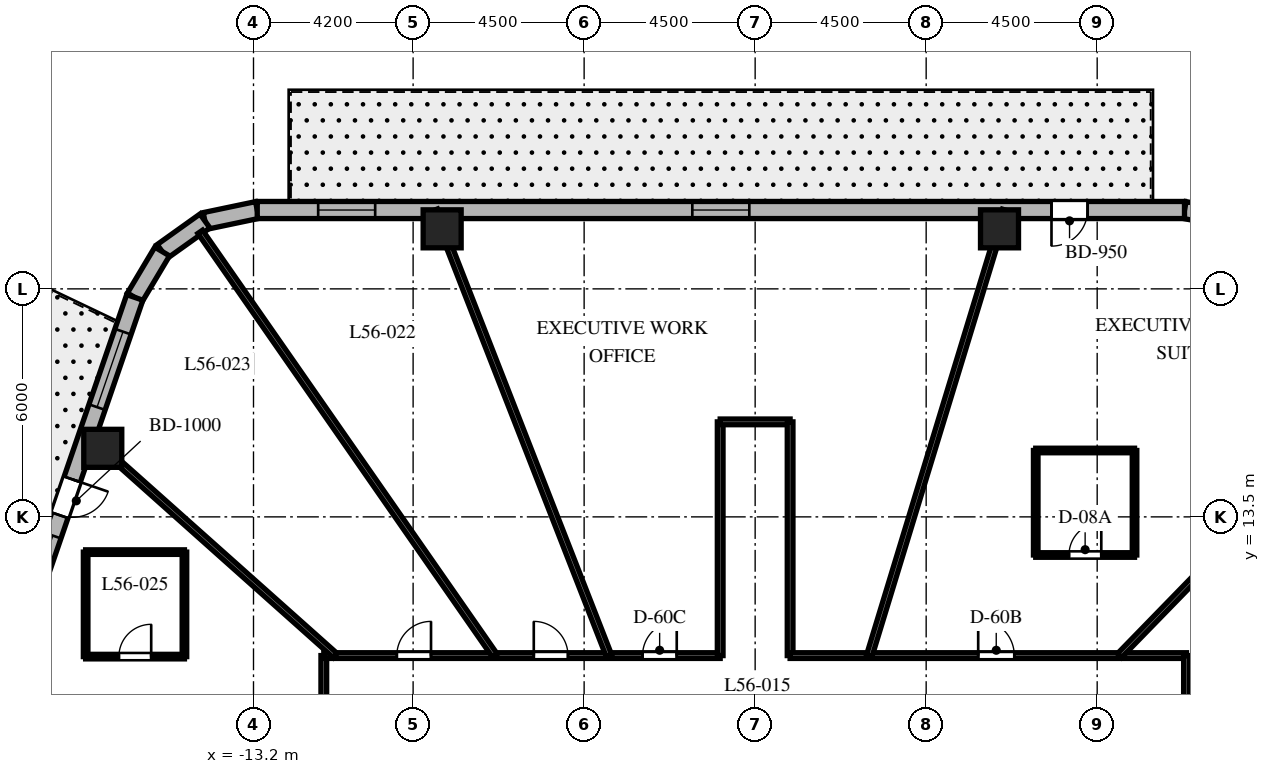
"""IFC4 building model, lengths in metres.
Left out: names, types, materials, properties, quantities, classifications, styles, units other than length and angle.
Written with IfcOpenShell. Run it as: python <this file> out.ifc"""

import sys

from ifc_helpers import new_model, si_unit, direction, frame, frame_2d, origin, origin_2d, place, context, subcontext, project, spatial, rectangle, extrude, element, fill, save


model = new_model("IFC4")
c1 = context("Model", 3, precision=1e-05, world=origin(), true_north=direction((0.0, 1.0)))
c2 = subcontext(c1, "Body", "Model", "MODEL_VIEW")
j1 = project(units=[si_unit("LENGTHUNIT", "METRE"), si_unit("PLANEANGLEUNIT", "RADIAN")], contexts=[c1])
p1 = place(None, origin())
s1 = spatial("IfcSite", under=j1, at=p1, CompositionType="ELEMENT")
p2 = place(p1, origin())
s2 = spatial("IfcBuilding", under=s1, at=p2, CompositionType="ELEMENT")
p3 = place(p2, frame((0.0, 0.0, 225.5)))
s3 = spatial("IfcBuildingStorey", under=s2, at=p3, CompositionType="ELEMENT", Elevation=225.5)
for number, where, z_axis, x_axis in (
    (1, (6.43, 21.08, 0.0), (0.0, 0.0, 1.0), (1.0, 0.0, 0.0)),
    (2, (-8.236, 21.08, 0.0), (0.0, 0.0, 1.0), (1.0, 0.0, 0.0)),
    (3, (-17.166, 15.304, 0.0), (0.0, 0.0, 1.0), (1.0, 0.0, 0.0)),
):
    element("IfcColumn", number, at=place(p3, frame(where, z_axis=z_axis, x_axis=x_axis)), inside=s3, PredefinedType="COLUMN", context=c2, shape_type="SweptSolid", body=[
        extrude(rectangle(XDim=1.0, YDim=1.0, at=origin_2d()), origin(), (0.0, 0.0, 1.0), 3.8),
    ])
p4 = place(p3, frame((12.546, 21.34, 0.0), z_axis=(0.0, 0.0, 1.0), x_axis=(-0.982686750835, 0.18527479519, 0.0)))
e4 = element("IfcWall", 4, at=p4, inside=s3, PredefinedType="SOLIDWALL", context=c2, shape_type="SweptSolid", body=[
    extrude(rectangle(XDim=1.27, YDim=0.45, at=frame_2d((0.635, 0.0))), origin(), (0.0, 0.0, 1.0), 3.5),
])
p5 = place(p3, frame((-13.102, 21.575, 0.0), z_axis=(0.0, 0.0, 1.0), x_axis=(-0.978757421505, -0.205021730188, 0.0)))
e5 = element("IfcWall", 5, at=p5, inside=s3, PredefinedType="SOLIDWALL", context=c2, shape_type="SweptSolid", body=[
    extrude(rectangle(XDim=1.406, YDim=0.45, at=frame_2d((0.703, 0.0))), origin(), (0.0, 0.0, 1.0), 3.5),
])
p6 = place(p3, frame((-14.478, 21.287, 0.0), z_axis=(0.0, 0.0, 1.0), x_axis=(-0.813888518617, -0.58102106611, 0.0)))
e6 = element("IfcWall", 6, at=p6, inside=s3, PredefinedType="SOLIDWALL", context=c2, shape_type="SweptSolid", body=[
    extrude(rectangle(XDim=1.383, YDim=0.45, at=frame_2d((0.691, 0.0))), origin(), (0.0, 0.0, 1.0), 3.5),
])
p7 = place(p3, frame((-15.604, 20.483, 0.0), z_axis=(0.0, 0.0, 1.0), x_axis=(-0.512222149036, -0.858852996756, 0.0)))
e7 = element("IfcWall", 7, at=p7, inside=s3, PredefinedType="SOLIDWALL", context=c2, shape_type="SweptSolid", body=[
    extrude(rectangle(XDim=1.406, YDim=0.45, at=frame_2d((0.703, 0.0))), origin(), (0.0, 0.0, 1.0), 3.5),
])
p8 = place(p3, frame((11.298, 21.575, 0.0), z_axis=(0.0, 0.0, 1.0), x_axis=(-1.0, 0.0, 0.0)))
e8 = element("IfcWall", 8, at=p8, inside=s3, PredefinedType="SOLIDWALL", context=c2, shape_type="SweptSolid", body=[
    extrude(rectangle(XDim=24.399, YDim=0.45, at=frame_2d((12.2, 0.0))), origin(), (0.0, 0.0, 1.0), 3.5),
])
p9 = place(p8, frame((2.55, 0.0, 0.0)))
e9 = element("IfcOpeningElement", 9, at=p9, cuts=e8, PredefinedType="OPENING", context=c2, shape_type="SweptSolid", body=[
    extrude(rectangle(XDim=0.95, YDim=2.15, at=frame_2d((0.475, 1.075))), frame((0.0, 0.235, 0.0), z_axis=(0.0, -1.0, 0.0), x_axis=(1.0, 0.0, 0.0)), (0.0, 0.0, 1.0), 0.47),
])
p10 = place(p8, frame((11.451, 0.0, 0.8)))
e10 = element("IfcOpeningElement", 10, at=p10, cuts=e8, PredefinedType="OPENING", context=c2, shape_type="SweptSolid", body=[
    extrude(rectangle(XDim=1.5, YDim=1.8, at=frame_2d((0.75, 0.9))), frame((0.0, 0.235, 0.0), z_axis=(0.0, -1.0, 0.0), x_axis=(1.0, 0.0, 0.0)), (0.0, 0.0, 1.0), 0.47),
])
p11 = place(p8, frame((21.296, 0.0, 0.8)))
e11 = element("IfcOpeningElement", 11, at=p11, cuts=e8, PredefinedType="OPENING", context=c2, shape_type="SweptSolid", body=[
    extrude(rectangle(XDim=1.5, YDim=1.8, at=frame_2d((0.75, 0.9))), frame((0.0, 0.235, 0.0), z_axis=(0.0, -1.0, 0.0), x_axis=(1.0, 0.0, 0.0)), (0.0, 0.0, 1.0), 0.47),
])
p12 = place(p3, frame((-16.324, 19.275, 0.0), z_axis=(0.0, 0.0, 1.0), x_axis=(-0.325083142304, -0.945685439557, 0.0)))
e12 = element("IfcWall", 12, at=p12, inside=s3, PredefinedType="SOLIDWALL", context=c2, shape_type="SweptSolid", body=[
    extrude(rectangle(XDim=20.224, YDim=0.45, at=frame_2d((10.112, 0.0))), origin(), (0.0, 0.0, 1.0), 3.5),
])
p13 = place(p12, frame((5.062, 0.0, 0.0)))
e13 = element("IfcOpeningElement", 13, at=p13, cuts=e12, PredefinedType="OPENING", context=c2, shape_type="SweptSolid", body=[
    extrude(rectangle(XDim=1.0, YDim=2.15, at=frame_2d((0.5, 1.075))), frame((0.0, 0.235, 0.0), z_axis=(0.0, -1.0, 0.0), x_axis=(1.0, 0.0, 0.0)), (0.0, 0.0, 1.0), 0.47),
])
p14 = place(p12, frame((0.953, 0.0, 0.8)))
e14 = element("IfcOpeningElement", 14, at=p14, cuts=e12, PredefinedType="OPENING", context=c2, shape_type="SweptSolid", body=[
    extrude(rectangle(XDim=2.1, YDim=1.85, at=frame_2d((1.05, 0.925))), frame((0.0, 0.235, 0.0), z_axis=(0.0, -1.0, 0.0), x_axis=(1.0, 0.0, 0.0)), (0.0, 0.0, 1.0), 0.47),
])
p15 = place(p12, frame((6.629, 0.0, 0.8)))
e15 = element("IfcOpeningElement", 15, at=p15, cuts=e12, PredefinedType="OPENING", context=c2, shape_type="SweptSolid", body=[
    extrude(rectangle(XDim=2.1, YDim=1.85, at=frame_2d((1.05, 0.925))), frame((0.0, 0.235, 0.0), z_axis=(0.0, -1.0, 0.0), x_axis=(1.0, 0.0, 0.0)), (0.0, 0.0, 1.0), 0.47),
])
p16 = place(p12, frame((12.312, 0.0, 0.8)))
e16 = element("IfcOpeningElement", 16, at=p16, cuts=e12, PredefinedType="OPENING", context=c2, shape_type="SweptSolid", body=[
    extrude(rectangle(XDim=2.1, YDim=1.85, at=frame_2d((1.05, 0.925))), frame((0.0, 0.235, 0.0), z_axis=(0.0, -1.0, 0.0), x_axis=(1.0, 0.0, 0.0)), (0.0, 0.0, 1.0), 0.47),
])
p17 = place(p12, frame((17.118, 0.0, 0.8)))
e17 = element("IfcOpeningElement", 17, at=p17, cuts=e12, PredefinedType="OPENING", context=c2, shape_type="SweptSolid", body=[
    extrude(rectangle(XDim=2.1, YDim=1.85, at=frame_2d((1.05, 0.925))), frame((0.0, 0.235, 0.0), z_axis=(0.0, -1.0, 0.0), x_axis=(1.0, 0.0, 0.0)), (0.0, 0.0, 1.0), 0.47),
])
p18 = place(p3, frame((-11.35, 4.4, 0.0), z_axis=(0.0, 0.0, 1.0), x_axis=(0.0, 1.0, 0.0)))
e18 = element("IfcWall", 18, at=p18, inside=s3, PredefinedType="PARTITIONING", context=c2, shape_type="SweptSolid", body=[
    extrude(rectangle(XDim=5.45, YDim=0.15, at=frame_2d((2.725, 0.0))), origin(), (0.0, 0.0, 1.0), 2.99),
])
p19 = place(p18, frame((2.466, 0.0, 0.0)))
e19 = element("IfcOpeningElement", 19, at=p19, cuts=e18, PredefinedType="OPENING", context=c2, shape_type="SweptSolid", body=[
    extrude(rectangle(XDim=0.95, YDim=2.03, at=frame_2d((0.475, 1.015))), frame((0.0, 0.085, 0.0), z_axis=(0.0, -1.0, 0.0), x_axis=(1.0, 0.0, 0.0)), (0.0, 0.0, 1.0), 0.17),
])
p20 = place(p3, frame((-11.35, 9.85, 0.0), z_axis=(0.0, 0.0, 1.0), x_axis=(1.0, 0.0, 0.0)))
e20 = element("IfcWall", 20, at=p20, inside=s3, PredefinedType="PARTITIONING", context=c2, shape_type="SweptSolid", body=[
    extrude(rectangle(XDim=10.43, YDim=0.15, at=frame_2d((5.215, 0.0))), origin(), (0.0, 0.0, 1.0), 2.99),
])
p21 = place(p20, frame((8.387, 0.0, 0.0)))
e21 = element("IfcOpeningElement", 21, at=p21, cuts=e20, PredefinedType="OPENING", context=c2, shape_type="SweptSolid", body=[
    extrude(rectangle(XDim=0.9, YDim=2.03, at=frame_2d((0.45, 1.015))), frame((0.0, 0.085, 0.0), z_axis=(0.0, -1.0, 0.0), x_axis=(1.0, 0.0, 0.0)), (0.0, 0.0, 1.0), 0.17),
])
p22 = place(p20, frame((5.525, 0.0, 0.0)))
e22 = element("IfcOpeningElement", 22, at=p22, cuts=e20, PredefinedType="OPENING", context=c2, shape_type="SweptSolid", body=[
    extrude(rectangle(XDim=0.9, YDim=2.03, at=frame_2d((0.45, 1.015))), frame((0.0, 0.085, 0.0), z_axis=(0.0, -1.0, 0.0), x_axis=(1.0, 0.0, 0.0)), (0.0, 0.0, 1.0), 0.17),
])
p23 = place(p20, frame((1.921, 0.0, 0.0)))
e23 = element("IfcOpeningElement", 23, at=p23, cuts=e20, PredefinedType="OPENING", context=c2, shape_type="SweptSolid", body=[
    extrude(rectangle(XDim=0.9, YDim=2.03, at=frame_2d((0.45, 1.015))), frame((0.0, 0.085, 0.0), z_axis=(0.0, -1.0, 0.0), x_axis=(1.0, 0.0, 0.0)), (0.0, 0.0, 1.0), 0.17),
])
p24 = place(p3, frame((-0.92, 9.85, 0.0), z_axis=(0.0, 0.0, 1.0), x_axis=(0.0, 1.0, 0.0)))
e24 = element("IfcWall", 24, at=p24, inside=s3, PredefinedType="PARTITIONING", context=c2, shape_type="SweptSolid", body=[
    extrude(rectangle(XDim=6.15, YDim=0.15, at=frame_2d((3.075, 0.0))), origin(), (0.0, 0.0, 1.0), 3.027),
])
p25 = place(p3, frame((-0.92, 16.0, 0.0), z_axis=(0.0, 0.0, 1.0), x_axis=(1.0, 0.0, 0.0)))
e25 = element("IfcWall", 25, at=p25, inside=s3, PredefinedType="PARTITIONING", context=c2, shape_type="SweptSolid", body=[
    extrude(rectangle(XDim=1.84, YDim=0.15, at=frame_2d((0.92, 0.0))), origin(), (0.0, 0.0, 1.0), 3.5),
])
p26 = place(p3, frame((0.92, 16.0, 0.0), z_axis=(0.0, 0.0, 1.0), x_axis=(0.0, -1.0, 0.0)))
e26 = element("IfcWall", 26, at=p26, inside=s3, PredefinedType="PARTITIONING", context=c2, shape_type="SweptSolid", body=[
    extrude(rectangle(XDim=6.15, YDim=0.15, at=frame_2d((3.075, 0.0))), origin(), (0.0, 0.0, 1.0), 3.027),
])
p27 = place(p3, frame((0.92, 9.85, 0.0), z_axis=(0.0, 0.0, 1.0), x_axis=(1.0, 0.0, 0.0)))
e27 = element("IfcWall", 27, at=p27, inside=s3, PredefinedType="PARTITIONING", context=c2, shape_type="SweptSolid", body=[
    extrude(rectangle(XDim=10.43, YDim=0.15, at=frame_2d((5.215, 0.0))), origin(), (0.0, 0.0, 1.0), 2.99),
])
p28 = place(p27, frame((4.949, 0.0, 0.0)))
e28 = element("IfcOpeningElement", 28, at=p28, cuts=e27, PredefinedType="OPENING", context=c2, shape_type="SweptSolid", body=[
    extrude(rectangle(XDim=0.95, YDim=2.03, at=frame_2d((0.475, 1.015))), frame((0.0, 0.085, 0.0), z_axis=(0.0, -1.0, 0.0), x_axis=(1.0, 0.0, 0.0)), (0.0, 0.0, 1.0), 0.17),
])
p29 = place(p3, frame((11.35, 9.85, 0.0), z_axis=(0.0, 0.0, 1.0), x_axis=(0.0, -1.0, 0.0)))
e29 = element("IfcWall", 29, at=p29, inside=s3, PredefinedType="PARTITIONING", context=c2, shape_type="SweptSolid", body=[
    extrude(rectangle(XDim=12.4, YDim=0.15, at=frame_2d((6.2, 0.0))), origin(), (0.0, 0.0, 1.0), 2.99),
])
p30 = place(p29, frame((4.443, 0.0, 0.0)))
e30 = element("IfcOpeningElement", 30, at=p30, cuts=e29, PredefinedType="OPENING", context=c2, shape_type="SweptSolid", body=[
    extrude(rectangle(XDim=0.95, YDim=2.03, at=frame_2d((0.475, 1.015))), frame((0.0, 0.085, 0.0), z_axis=(0.0, -1.0, 0.0), x_axis=(1.0, 0.0, 0.0)), (0.0, 0.0, 1.0), 0.17),
])
p31 = place(p29, frame((1.242, 0.0, 0.0)))
e31 = element("IfcOpeningElement", 31, at=p31, cuts=e29, PredefinedType="OPENING", context=c2, shape_type="SweptSolid", body=[
    extrude(rectangle(XDim=0.9, YDim=2.03, at=frame_2d((0.45, 1.015))), frame((0.0, 0.085, 0.0), z_axis=(0.0, -1.0, 0.0), x_axis=(1.0, 0.0, 0.0)), (0.0, 0.0, 1.0), 0.17),
])
p32 = place(p29, frame((8.835, 0.0, 0.0)))
e32 = element("IfcOpeningElement", 32, at=p32, cuts=e29, PredefinedType="OPENING", context=c2, shape_type="SweptSolid", body=[
    extrude(rectangle(XDim=0.95, YDim=2.03, at=frame_2d((0.475, 1.015))), frame((0.0, 0.085, 0.0), z_axis=(0.0, -1.0, 0.0), x_axis=(1.0, 0.0, 0.0)), (0.0, 0.0, 1.0), 0.17),
])
p33 = place(p3, frame((11.35, 6.705, 0.0), z_axis=(0.0, 0.0, 1.0), x_axis=(0.86097625004, 0.508645158108, 0.0)))
e33 = element("IfcWall", 33, at=p33, inside=s3, PredefinedType="PARTITIONING", context=c2, shape_type="SweptSolid", body=[
    extrude(rectangle(XDim=8.406, YDim=0.15, at=frame_2d((4.203, 0.0))), origin(), (0.0, 0.0, 1.0), 2.74),
])
p34 = place(p3, frame((9.588, 9.85, 0.0), z_axis=(0.0, 0.0, 1.0), x_axis=(0.697519469595, 0.716565830567, 0.0)))
e34 = element("IfcWall", 34, at=p34, inside=s3, PredefinedType="PARTITIONING", context=c2, shape_type="SweptSolid", body=[
    extrude(rectangle(XDim=9.126, YDim=0.15, at=frame_2d((4.563, 0.0))), origin(), (0.0, 0.0, 1.0), 2.74),
])
p35 = place(p3, frame((3.004, 9.85, 0.0), z_axis=(0.0, 0.0, 1.0), x_axis=(0.291775760688, 0.956486751333, 0.0)))
e35 = element("IfcWall", 35, at=p35, inside=s3, PredefinedType="PARTITIONING", context=c2, shape_type="SweptSolid", body=[
    extrude(rectangle(XDim=12.258, YDim=0.15, at=frame_2d((6.129, 0.0))), origin(), (0.0, 0.0, 1.0), 2.74),
])
p36 = place(p3, frame((-3.848, 9.85, 0.0), z_axis=(0.0, 0.0, 1.0), x_axis=(-0.363921778212, 0.931429513889, 0.0)))
e36 = element("IfcWall", 36, at=p36, inside=s3, PredefinedType="PARTITIONING", context=c2, shape_type="SweptSolid", body=[
    extrude(rectangle(XDim=12.588, YDim=0.15, at=frame_2d((6.294, 0.0))), origin(), (0.0, 0.0, 1.0), 2.74),
])
p37 = place(p3, frame((-6.849, 9.85, 0.0), z_axis=(0.0, 0.0, 1.0), x_axis=(-0.570871709026, 0.821039275451, 0.0)))
e37 = element("IfcWall", 37, at=p37, inside=s3, PredefinedType="PARTITIONING", context=c2, shape_type="SweptSolid", body=[
    extrude(rectangle(XDim=13.582, YDim=0.15, at=frame_2d((6.791, 0.0))), origin(), (0.0, 0.0, 1.0), 2.74),
])
p38 = place(p3, frame((-11.048, 9.85, 0.0), z_axis=(0.0, 0.0, 1.0), x_axis=(-0.746444434655, 0.665447748492, 0.0)))
e38 = element("IfcWall", 38, at=p38, inside=s3, PredefinedType="PARTITIONING", context=c2, shape_type="SweptSolid", body=[
    extrude(rectangle(XDim=8.732, YDim=0.15, at=frame_2d((4.366, 0.0))), origin(), (0.0, 0.0, 1.0), 2.74),
])
p39 = place(p3, frame((-11.35, 5.072, 0.0), z_axis=(0.0, 0.0, 1.0), x_axis=(-0.912980177983, 0.408003914944, 0.0)))
e39 = element("IfcWall", 39, at=p39, inside=s3, PredefinedType="PARTITIONING", context=c2, shape_type="SweptSolid", body=[
    extrude(rectangle(XDim=9.358, YDim=0.15, at=frame_2d((4.679, 0.0))), origin(), (0.0, 0.0, 1.0), 2.74),
])
p40 = place(p3, frame((7.383, 12.497, 0.0), z_axis=(0.0, 0.0, 1.0), x_axis=(1.0, 0.0, 0.0)))
e40 = element("IfcWall", 40, at=p40, inside=s3, PredefinedType="PARTITIONING", context=c2, shape_type="SweptSolid", body=[
    extrude(rectangle(XDim=2.6, YDim=0.12, at=frame_2d((1.3, 0.0))), origin(), (0.0, 0.0, 1.0), 2.94),
])
p41 = place(p40, frame((0.875, 0.0, 0.0)))
e41 = element("IfcOpeningElement", 41, at=p41, cuts=e40, PredefinedType="OPENING", context=c2, shape_type="SweptSolid", body=[
    extrude(rectangle(XDim=0.85, YDim=2.03, at=frame_2d((0.425, 1.015))), frame((0.0, 0.07, 0.0), z_axis=(0.0, -1.0, 0.0), x_axis=(1.0, 0.0, 0.0)), (0.0, 0.0, 1.0), 0.14),
])
p42 = place(p3, frame((9.983, 12.497, 0.0), z_axis=(0.0, 0.0, 1.0), x_axis=(0.0, 1.0, 0.0)))
e42 = element("IfcWall", 42, at=p42, inside=s3, PredefinedType="PARTITIONING", context=c2, shape_type="SweptSolid", body=[
    extrude(rectangle(XDim=2.75, YDim=0.12, at=frame_2d((1.375, 0.0))), origin(), (0.0, 0.0, 1.0), 3.073),
])
p43 = place(p3, frame((9.983, 15.247, 0.0), z_axis=(0.0, 0.0, 1.0), x_axis=(-1.0, 0.0, 0.0)))
e43 = element("IfcWall", 43, at=p43, inside=s3, PredefinedType="PARTITIONING", context=c2, shape_type="SweptSolid", body=[
    extrude(rectangle(XDim=2.6, YDim=0.12, at=frame_2d((1.3, 0.0))), origin(), (0.0, 0.0, 1.0), 3.073),
])
p44 = place(p3, frame((7.383, 15.247, 0.0), z_axis=(0.0, 0.0, 1.0), x_axis=(0.0, -1.0, 0.0)))
e44 = element("IfcWall", 44, at=p44, inside=s3, PredefinedType="PARTITIONING", context=c2, shape_type="SweptSolid", body=[
    extrude(rectangle(XDim=2.75, YDim=0.12, at=frame_2d((1.375, 0.0))), origin(), (0.0, 0.0, 1.0), 2.94),
])
p45 = place(p3, frame((-17.617, 9.823, 0.0), z_axis=(0.0, 0.0, 1.0), x_axis=(1.0, 0.0, 0.0)))
e45 = element("IfcWall", 45, at=p45, inside=s3, PredefinedType="PARTITIONING", context=c2, shape_type="SweptSolid", body=[
    extrude(rectangle(XDim=2.6, YDim=0.12, at=frame_2d((1.3, 0.0))), origin(), (0.0, 0.0, 1.0), 3.073),
])
p46 = place(p45, frame((0.875, 0.0, 0.0)))
e46 = element("IfcOpeningElement", 46, at=p46, cuts=e45, PredefinedType="OPENING", context=c2, shape_type="SweptSolid", body=[
    extrude(rectangle(XDim=0.85, YDim=2.03, at=frame_2d((0.425, 1.015))), frame((0.0, 0.07, 0.0), z_axis=(0.0, -1.0, 0.0), x_axis=(1.0, 0.0, 0.0)), (0.0, 0.0, 1.0), 0.14),
])
p47 = place(p3, frame((-15.017, 9.823, 0.0), z_axis=(0.0, 0.0, 1.0), x_axis=(0.0, 1.0, 0.0)))
e47 = element("IfcWall", 47, at=p47, inside=s3, PredefinedType="PARTITIONING", context=c2, shape_type="SweptSolid", body=[
    extrude(rectangle(XDim=2.75, YDim=0.12, at=frame_2d((1.375, 0.0))), origin(), (0.0, 0.0, 1.0), 3.073),
])
p48 = place(p3, frame((-15.017, 12.573, 0.0), z_axis=(0.0, 0.0, 1.0), x_axis=(-1.0, 0.0, 0.0)))
e48 = element("IfcWall", 48, at=p48, inside=s3, PredefinedType="PARTITIONING", context=c2, shape_type="SweptSolid", body=[
    extrude(rectangle(XDim=2.6, YDim=0.12, at=frame_2d((1.3, 0.0))), origin(), (0.0, 0.0, 1.0), 3.5),
])
p49 = place(p3, frame((-17.617, 12.573, 0.0), z_axis=(0.0, 0.0, 1.0), x_axis=(0.0, -1.0, 0.0)))
e49 = element("IfcWall", 49, at=p49, inside=s3, PredefinedType="PARTITIONING", context=c2, shape_type="SweptSolid", body=[
    extrude(rectangle(XDim=2.75, YDim=0.12, at=frame_2d((1.375, 0.0))), origin(), (0.0, 0.0, 1.0), 3.5),
])
p50 = place(p9, origin())
e50 = element("IfcDoor", 50, at=p50, inside=s3, OperationType="SINGLE_SWING_RIGHT", PredefinedType="DOOR", context=c2, shape_type="SweptSolid", body=[
    extrude(rectangle(XDim=0.95, YDim=2.15, at=frame_2d((0.475, 1.075))), frame((0.0, 0.025, 0.0), z_axis=(0.0, -1.0, 0.0), x_axis=(1.0, 0.0, 0.0)), (0.0, 0.0, 1.0), 0.05),
])
fill(e9, e50)
p51 = place(p10, origin())
e51 = element("IfcWindow", 51, at=p51, inside=s3, PartitioningType="SINGLE_PANEL", PredefinedType="WINDOW", context=c2, shape_type="SweptSolid", body=[
    extrude(rectangle(XDim=1.5, YDim=1.8, at=frame_2d((0.75, 0.9))), frame((0.0, 0.03, 0.0), z_axis=(0.0, -1.0, 0.0), x_axis=(1.0, 0.0, 0.0)), (0.0, 0.0, 1.0), 0.06),
])
fill(e10, e51)
p52 = place(p11, origin())
e52 = element("IfcWindow", 52, at=p52, inside=s3, PartitioningType="SINGLE_PANEL", PredefinedType="WINDOW", context=c2, shape_type="SweptSolid", body=[
    extrude(rectangle(XDim=1.5, YDim=1.8, at=frame_2d((0.75, 0.9))), frame((0.0, 0.03, 0.0), z_axis=(0.0, -1.0, 0.0), x_axis=(1.0, 0.0, 0.0)), (0.0, 0.0, 1.0), 0.06),
])
fill(e11, e52)
p53 = place(p13, origin())
e53 = element("IfcDoor", 53, at=p53, inside=s3, OperationType="SINGLE_SWING_LEFT", PredefinedType="DOOR", context=c2, shape_type="SweptSolid", body=[
    extrude(rectangle(XDim=1.0, YDim=2.15, at=frame_2d((0.5, 1.075))), frame((0.0, 0.025, 0.0), z_axis=(0.0, -1.0, 0.0), x_axis=(1.0, 0.0, 0.0)), (0.0, 0.0, 1.0), 0.05),
])
fill(e13, e53)
p54 = place(p14, origin())
e54 = element("IfcWindow", 54, at=p54, inside=s3, PartitioningType="SINGLE_PANEL", PredefinedType="WINDOW", context=c2, shape_type="SweptSolid", body=[
    extrude(rectangle(XDim=2.1, YDim=1.85, at=frame_2d((1.05, 0.925))), frame((0.0, 0.03, 0.0), z_axis=(0.0, -1.0, 0.0), x_axis=(1.0, 0.0, 0.0)), (0.0, 0.0, 1.0), 0.06),
])
fill(e14, e54)
p55 = place(p15, origin())
e55 = element("IfcWindow", 55, at=p55, inside=s3, PartitioningType="SINGLE_PANEL", PredefinedType="WINDOW", context=c2, shape_type="SweptSolid", body=[
    extrude(rectangle(XDim=2.1, YDim=1.85, at=frame_2d((1.05, 0.925))), frame((0.0, 0.03, 0.0), z_axis=(0.0, -1.0, 0.0), x_axis=(1.0, 0.0, 0.0)), (0.0, 0.0, 1.0), 0.06),
])
fill(e15, e55)
p56 = place(p28, origin())
e56 = element("IfcDoor", 56, at=p56, inside=s3, OperationType="SINGLE_SWING_LEFT", PredefinedType="DOOR", context=c2, shape_type="SweptSolid", body=[
    extrude(rectangle(XDim=0.95, YDim=2.03, at=frame_2d((0.475, 1.015))), frame((0.0, 0.025, 0.0), z_axis=(0.0, -1.0, 0.0), x_axis=(1.0, 0.0, 0.0)), (0.0, 0.0, 1.0), 0.05),
])
fill(e28, e56)
p57 = place(p41, origin())
e57 = element("IfcDoor", 57, at=p57, inside=s3, OperationType="SINGLE_SWING_RIGHT", PredefinedType="DOOR", context=c2, shape_type="SweptSolid", body=[
    extrude(rectangle(XDim=0.85, YDim=2.03, at=frame_2d((0.425, 1.015))), frame((0.0, 0.025, 0.0), z_axis=(0.0, -1.0, 0.0), x_axis=(1.0, 0.0, 0.0)), (0.0, 0.0, 1.0), 0.05),
])
fill(e41, e57)
p58 = place(p21, origin())
e58 = element("IfcDoor", 58, at=p58, inside=s3, OperationType="SINGLE_SWING_RIGHT", PredefinedType="DOOR", context=c2, shape_type="SweptSolid", body=[
    extrude(rectangle(XDim=0.9, YDim=2.03, at=frame_2d((0.45, 1.015))), frame((0.0, 0.025, 0.0), z_axis=(0.0, -1.0, 0.0), x_axis=(1.0, 0.0, 0.0)), (0.0, 0.0, 1.0), 0.05),
])
fill(e21, e58)
p59 = place(p22, origin())
e59 = element("IfcDoor", 59, at=p59, inside=s3, OperationType="SINGLE_SWING_LEFT", PredefinedType="DOOR", context=c2, shape_type="SweptSolid", body=[
    extrude(rectangle(XDim=0.9, YDim=2.03, at=frame_2d((0.45, 1.015))), frame((0.0, 0.025, 0.0), z_axis=(0.0, -1.0, 0.0), x_axis=(1.0, 0.0, 0.0)), (0.0, 0.0, 1.0), 0.05),
])
fill(e22, e59)
p60 = place(p23, origin())
e60 = element("IfcDoor", 60, at=p60, inside=s3, OperationType="SINGLE_SWING_RIGHT", PredefinedType="DOOR", context=c2, shape_type="SweptSolid", body=[
    extrude(rectangle(XDim=0.9, YDim=2.03, at=frame_2d((0.45, 1.015))), frame((0.0, 0.025, 0.0), z_axis=(0.0, -1.0, 0.0), x_axis=(1.0, 0.0, 0.0)), (0.0, 0.0, 1.0), 0.05),
])
fill(e23, e60)
p61 = place(p46, origin())
e61 = element("IfcDoor", 61, at=p61, inside=s3, OperationType="SINGLE_SWING_RIGHT", PredefinedType="DOOR", context=c2, shape_type="SweptSolid", body=[
    extrude(rectangle(XDim=0.85, YDim=2.03, at=frame_2d((0.425, 1.015))), frame((0.0, 0.025, 0.0), z_axis=(0.0, -1.0, 0.0), x_axis=(1.0, 0.0, 0.0)), (0.0, 0.0, 1.0), 0.05),
])
fill(e46, e61)
save(model, sys.argv[1])
